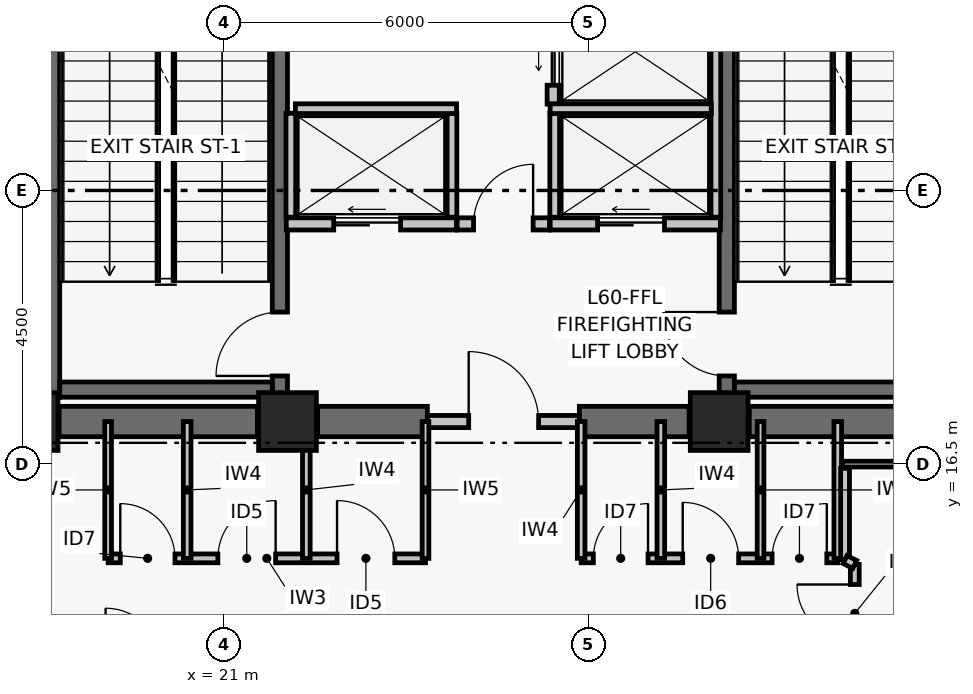
"""IFC4 building model, lengths in metres.
Left out: names, types, materials, properties, quantities, classifications, styles, units other than length and angle.
Written with IfcOpenShell. Run it as: python <this file> out.ifc"""

import sys

from ifc_helpers import new_model, si_unit, direction, frame, frame_2d, origin, origin_2d, place, context, subcontext, project, spatial, rectangle, extrude, element, fill, save


model = new_model("IFC4")
c1 = context("Model", 3, precision=1e-05, world=origin(), true_north=direction((0.0, 1.0)))
c2 = subcontext(c1, "Body", "Model", "MODEL_VIEW")
j1 = project(units=[si_unit("LENGTHUNIT", "METRE"), si_unit("PLANEANGLEUNIT", "RADIAN")], contexts=[c1])
p1 = place(None, origin())
s1 = spatial("IfcSite", under=j1, at=p1, CompositionType="ELEMENT")
p2 = place(p1, origin())
s2 = spatial("IfcBuilding", under=s1, at=p2, CompositionType="ELEMENT")
p3 = place(p2, frame((0.0, 0.0, 238.14)))
s3 = spatial("IfcBuildingStorey", under=s2, at=p3, CompositionType="ELEMENT", Elevation=238.14)
for number, where, z_axis, x_axis in (
    (1, (17.8, 17.2, 0.0), (0.0, 0.0, 1.0), (1.0, 0.0, 0.0)),
    (2, (22.05, 17.2, 0.0), (0.0, 0.0, 1.0), (1.0, 0.0, 0.0)),
    (3, (29.15, 17.2, 0.0), (0.0, 0.0, 1.0), (1.0, 0.0, 0.0)),
):
    element("IfcColumn", number, at=place(p3, frame(where, z_axis=z_axis, x_axis=x_axis)), inside=s3, PredefinedType="COLUMN", context=c2, shape_type="SweptSolid", body=[
        extrude(rectangle(XDim=0.95, YDim=0.95, at=origin_2d()), origin(), (0.0, 0.0, 1.0), 4.5),
    ])
p4 = place(p3, frame((18.295, 17.2, 0.0), z_axis=(0.0, 0.0, 1.0), x_axis=(1.0, 0.0, 0.0)))
e4 = element("IfcWall", 4, at=p4, inside=s3, PredefinedType="SHEAR", context=c2, shape_type="SweptSolid", body=[
    extrude(rectangle(XDim=3.26, YDim=0.5, at=frame_2d((1.63, 0.0))), origin(), (0.0, 0.0, 1.0), 4.22),
])
p5 = place(p3, frame((22.545, 17.2, 0.0), z_axis=(0.0, 0.0, 1.0), x_axis=(1.0, 0.0, 0.0)))
e5 = element("IfcWall", 5, at=p5, inside=s3, PredefinedType="SHEAR", context=c2, shape_type="SweptSolid", body=[
    extrude(rectangle(XDim=1.805, YDim=0.5, at=frame_2d((0.903, 0.0))), origin(), (0.0, 0.0, 1.0), 4.22),
])
p6 = place(p3, frame((26.85, 17.2, 0.0), z_axis=(0.0, 0.0, 1.0), x_axis=(1.0, 0.0, 0.0)))
e6 = element("IfcWall", 6, at=p6, inside=s3, PredefinedType="SHEAR", context=c2, shape_type="SweptSolid", body=[
    extrude(rectangle(XDim=1.805, YDim=0.5, at=frame_2d((0.902, 0.0))), origin(), (0.0, 0.0, 1.0), 4.22),
])
p7 = place(p3, frame((29.645, 17.2, 0.0), z_axis=(0.0, 0.0, 1.0), x_axis=(1.0, 0.0, 0.0)))
e7 = element("IfcWall", 7, at=p7, inside=s3, PredefinedType="SHEAR", context=c2, shape_type="SweptSolid", body=[
    extrude(rectangle(XDim=3.26, YDim=0.5, at=frame_2d((1.63, 0.0))), origin(), (0.0, 0.0, 1.0), 4.22),
])
p8 = place(p3, frame((18.179, 17.6, 0.0), z_axis=(0.0, 0.0, 1.0), x_axis=(0.0, 1.0, 0.0)))
e8 = element("IfcWall", 8, at=p8, inside=s3, PredefinedType="SHEAR", context=c2, shape_type="SweptSolid", body=[
    extrude(rectangle(XDim=8.8, YDim=0.25, at=frame_2d((4.4, 0.0))), origin(), (0.0, 0.0, 1.0), 4.22),
])
p9 = place(p3, frame((21.925, 17.6, 0.0), z_axis=(0.0, 0.0, 1.0), x_axis=(0.0, 1.0, 0.0)))
e9 = element("IfcWall", 9, at=p9, inside=s3, PredefinedType="SHEAR", context=c2, shape_type="SweptSolid", body=[
    extrude(rectangle(XDim=8.8, YDim=0.25, at=frame_2d((4.4, 0.0))), origin(), (0.0, 0.0, 1.0), 4.22),
])
p10 = place(p9, frame((0.35, 0.0, 0.0)))
e10 = element("IfcOpeningElement", 10, at=p10, cuts=e9, PredefinedType="OPENING", context=c2, shape_type="SweptSolid", body=[
    extrude(rectangle(XDim=1.05, YDim=2.08, at=frame_2d((0.525, 1.04))), frame((0.0, 0.135, 0.0), z_axis=(0.0, -1.0, 0.0), x_axis=(1.0, 0.0, 0.0)), (0.0, 0.0, 1.0), 0.27),
])
p11 = place(p3, frame((18.304, 17.725, 0.0), z_axis=(0.0, 0.0, 1.0), x_axis=(1.0, 0.0, 0.0)))
e11 = element("IfcWall", 11, at=p11, inside=s3, PredefinedType="SHEAR", context=c2, shape_type="SweptSolid", body=[
    extrude(rectangle(XDim=3.496, YDim=0.25, at=frame_2d((1.748, 0.0))), origin(), (0.0, 0.0, 1.0), 4.22),
])
p12 = place(p3, frame((29.275, 17.6, 0.0), z_axis=(0.0, 0.0, 1.0), x_axis=(0.0, 1.0, 0.0)))
e12 = element("IfcWall", 12, at=p12, inside=s3, PredefinedType="SHEAR", context=c2, shape_type="SweptSolid", body=[
    extrude(rectangle(XDim=8.8, YDim=0.25, at=frame_2d((4.4, 0.0))), origin(), (0.0, 0.0, 1.0), 4.22),
])
p13 = place(p12, frame((0.35, 0.0, 0.0)))
e13 = element("IfcOpeningElement", 13, at=p13, cuts=e12, PredefinedType="OPENING", context=c2, shape_type="SweptSolid", body=[
    extrude(rectangle(XDim=1.05, YDim=2.08, at=frame_2d((0.525, 1.04))), frame((0.0, 0.135, 0.0), z_axis=(0.0, -1.0, 0.0), x_axis=(1.0, 0.0, 0.0)), (0.0, 0.0, 1.0), 0.27),
])
p14 = place(p3, frame((29.4, 17.725, 0.0), z_axis=(0.0, 0.0, 1.0), x_axis=(1.0, 0.0, 0.0)))
e14 = element("IfcWall", 14, at=p14, inside=s3, PredefinedType="SHEAR", context=c2, shape_type="SweptSolid", body=[
    extrude(rectangle(XDim=3.496, YDim=0.25, at=frame_2d((1.748, 0.0))), origin(), (0.0, 0.0, 1.0), 4.22),
])
p15 = place(p3, frame((24.35, 17.2, 0.0), z_axis=(0.0, 0.0, 1.0), x_axis=(1.0, 0.0, 0.0)))
e15 = element("IfcWall", 15, at=p15, inside=s3, PredefinedType="PARTITIONING", context=c2, shape_type="SweptSolid", body=[
    extrude(rectangle(XDim=2.5, YDim=0.2, at=frame_2d((1.25, 0.0))), origin(), (0.0, 0.0, 1.0), 3.35),
])
p16 = place(p15, frame((0.68, 0.0, 0.0)))
e16 = element("IfcOpeningElement", 16, at=p16, cuts=e15, PredefinedType="OPENING", context=c2, shape_type="SweptSolid", body=[
    extrude(rectangle(XDim=1.15, YDim=2.08, at=frame_2d((0.575, 1.04))), frame((0.0, 0.11, 0.0), z_axis=(0.0, -1.0, 0.0), x_axis=(1.0, 0.0, 0.0)), (0.0, 0.0, 1.0), 0.22),
])
p17 = place(p3, frame((24.84, 20.45, 0.0), z_axis=(0.0, 0.0, 1.0), x_axis=(1.0, 0.0, 0.0)))
e17 = element("IfcWall", 17, at=p17, inside=s3, PredefinedType="PARTITIONING", context=c2, shape_type="SweptSolid", body=[
    extrude(rectangle(XDim=1.52, YDim=0.2, at=frame_2d((0.76, 0.0))), origin(), (0.0, 0.0, 1.0), 4.22),
])
p18 = place(p17, frame((0.27, 0.0, 0.0)))
e18 = element("IfcOpeningElement", 18, at=p18, cuts=e17, PredefinedType="OPENING", context=c2, shape_type="SweptSolid", body=[
    extrude(rectangle(XDim=0.98, YDim=2.06, at=frame_2d((0.49, 1.03))), frame((0.0, 0.11, 0.0), z_axis=(0.0, -1.0, 0.0), x_axis=(1.0, 0.0, 0.0)), (0.0, 0.0, 1.0), 0.22),
])
p19 = place(p3, frame((22.03, 20.45, 0.0), z_axis=(0.0, 0.0, 1.0), x_axis=(1.0, 0.0, 0.0)))
e19 = element("IfcWall", 19, at=p19, inside=s3, PredefinedType="PARTITIONING", context=c2, shape_type="SweptSolid", body=[
    extrude(rectangle(XDim=2.8, YDim=0.2, at=frame_2d((1.4, 0.0))), origin(), (0.0, 0.0, 1.0), 4.22),
])
p20 = place(p19, frame((0.78, 0.0, 0.0)))
e20 = element("IfcOpeningElement", 20, at=p20, cuts=e19, PredefinedType="OPENING", context=c2, shape_type="SweptSolid", body=[
    extrude(rectangle(XDim=1.1, YDim=2.08, at=frame_2d((0.55, 1.04))), frame((0.0, 0.11, 0.0), z_axis=(0.0, -1.0, 0.0), x_axis=(1.0, 0.0, 0.0)), (0.0, 0.0, 1.0), 0.22),
])
p21 = place(p3, frame((26.37, 20.45, 0.0), z_axis=(0.0, 0.0, 1.0), x_axis=(1.0, 0.0, 0.0)))
e21 = element("IfcWall", 21, at=p21, inside=s3, PredefinedType="PARTITIONING", context=c2, shape_type="SweptSolid", body=[
    extrude(rectangle(XDim=2.8, YDim=0.2, at=frame_2d((1.4, 0.0))), origin(), (0.0, 0.0, 1.0), 4.22),
])
p22 = place(p21, frame((0.78, 0.0, 0.0)))
e22 = element("IfcOpeningElement", 22, at=p22, cuts=e21, PredefinedType="OPENING", context=c2, shape_type="SweptSolid", body=[
    extrude(rectangle(XDim=1.1, YDim=2.08, at=frame_2d((0.55, 1.04))), frame((0.0, 0.11, 0.0), z_axis=(0.0, -1.0, 0.0), x_axis=(1.0, 0.0, 0.0)), (0.0, 0.0, 1.0), 0.22),
])
p23 = place(p3, frame((26.42, 22.42, 0.0), z_axis=(0.0, 0.0, 1.0), x_axis=(0.0, 1.0, 0.0)))
e23 = element("IfcWall", 23, at=p23, inside=s3, PredefinedType="PARTITIONING", context=c2, shape_type="SweptSolid", body=[
    extrude(rectangle(XDim=1.72, YDim=0.2, at=frame_2d((0.86, 0.0))), origin(), (0.0, 0.0, 1.0), 4.22),
])
p24 = place(p23, frame((0.31, 0.0, 0.0)))
e24 = element("IfcOpeningElement", 24, at=p24, cuts=e23, PredefinedType="OPENING", context=c2, shape_type="SweptSolid", body=[
    extrude(rectangle(XDim=1.1, YDim=2.08, at=frame_2d((0.55, 1.04))), frame((0.0, 0.11, 0.0), z_axis=(0.0, -1.0, 0.0), x_axis=(1.0, 0.0, 0.0)), (0.0, 0.0, 1.0), 0.22),
])
for number, where, z_axis, x_axis in (
    (25, (22.105, 20.56, 0.0), (0.0, 0.0, 1.0), (0.0, 1.0, 0.0)),
    (26, (24.755, 20.56, 0.0), (0.0, 0.0, 1.0), (0.0, 1.0, 0.0)),
):
    element("IfcWall", number, at=place(p3, frame(where, z_axis=z_axis, x_axis=x_axis)), inside=s3, PredefinedType="PARTITIONING", context=c2, shape_type="SweptSolid", body=[
        extrude(rectangle(XDim=1.71, YDim=0.16, at=frame_2d((0.855, 0.0))), origin(), (0.0, 0.0, 1.0), 4.22),
    ])
p25 = place(p3, frame((22.18, 22.345, 0.0), z_axis=(0.0, 0.0, 1.0), x_axis=(1.0, 0.0, 0.0)))
e27 = element("IfcWall", 27, at=p25, inside=s3, PredefinedType="PARTITIONING", context=c2, shape_type="SweptSolid", body=[
    extrude(rectangle(XDim=2.65, YDim=0.16, at=frame_2d((1.325, 0.0))), origin(), (0.0, 0.0, 1.0), 4.22),
])
p26 = place(p3, frame((29.095, 20.56, 0.0), z_axis=(0.0, 0.0, 1.0), x_axis=(0.0, 1.0, 0.0)))
e28 = element("IfcWall", 28, at=p26, inside=s3, PredefinedType="PARTITIONING", context=c2, shape_type="SweptSolid", body=[
    extrude(rectangle(XDim=3.58, YDim=0.16, at=frame_2d((1.79, 0.0))), origin(), (0.0, 0.0, 1.0), 4.22),
])
p27 = place(p3, frame((26.445, 20.56, 0.0), z_axis=(0.0, 0.0, 1.0), x_axis=(0.0, 1.0, 0.0)))
e29 = element("IfcWall", 29, at=p27, inside=s3, PredefinedType="PARTITIONING", context=c2, shape_type="SweptSolid", body=[
    extrude(rectangle(XDim=1.71, YDim=0.16, at=frame_2d((0.855, 0.0))), origin(), (0.0, 0.0, 1.0), 4.22),
])
p28 = place(p3, frame((26.37, 22.345, 0.0), z_axis=(0.0, 0.0, 1.0), x_axis=(1.0, 0.0, 0.0)))
e30 = element("IfcWall", 30, at=p28, inside=s3, PredefinedType="PARTITIONING", context=c2, shape_type="SweptSolid", body=[
    extrude(rectangle(XDim=2.65, YDim=0.16, at=frame_2d((1.325, 0.0))), origin(), (0.0, 0.0, 1.0), 4.22),
])
p29 = place(p3, frame((19.1, 14.95, 0.0), z_axis=(0.0, 0.0, 1.0), x_axis=(1.0, 0.0, 0.0)))
e31 = element("IfcWall", 31, at=p29, inside=s3, PredefinedType="PARTITIONING", context=c2, shape_type="SweptSolid", body=[
    extrude(rectangle(XDim=5.22, YDim=0.145, at=frame_2d((2.61, 0.0))), origin(), (0.0, 0.0, 1.0), 3.5),
])
p30 = place(p29, frame((0.2, 0.0, 0.0)))
e32 = element("IfcOpeningElement", 32, at=p30, cuts=e31, PredefinedType="OPENING", context=c2, shape_type="SweptSolid", body=[
    extrude(rectangle(XDim=0.9, YDim=2.02, at=frame_2d((0.45, 1.01))), frame((0.0, 0.083, 0.0), z_axis=(0.0, -1.0, 0.0), x_axis=(1.0, 0.0, 0.0)), (0.0, 0.0, 1.0), 0.165),
])
p31 = place(p29, frame((1.805, 0.0, 0.0)))
e33 = element("IfcOpeningElement", 33, at=p31, cuts=e31, PredefinedType="OPENING", context=c2, shape_type="SweptSolid", body=[
    extrude(rectangle(XDim=0.95, YDim=2.06, at=frame_2d((0.475, 1.03))), frame((0.0, 0.083, 0.0), z_axis=(0.0, -1.0, 0.0), x_axis=(1.0, 0.0, 0.0)), (0.0, 0.0, 1.0), 0.165),
])
p32 = place(p29, frame((3.765, 0.0, 0.0)))
e34 = element("IfcOpeningElement", 34, at=p32, cuts=e31, PredefinedType="OPENING", context=c2, shape_type="SweptSolid", body=[
    extrude(rectangle(XDim=0.95, YDim=2.06, at=frame_2d((0.475, 1.03))), frame((0.0, 0.083, 0.0), z_axis=(0.0, -1.0, 0.0), x_axis=(1.0, 0.0, 0.0)), (0.0, 0.0, 1.0), 0.165),
])
p33 = place(p3, frame((26.88, 14.95, 0.0), z_axis=(0.0, 0.0, 1.0), x_axis=(1.0, 0.0, 0.0)))
e35 = element("IfcWall", 35, at=p33, inside=s3, PredefinedType="PARTITIONING", context=c2, shape_type="SweptSolid", body=[
    extrude(rectangle(XDim=4.22, YDim=0.145, at=frame_2d((2.11, 0.0))), origin(), (0.0, 0.0, 1.0), 3.7),
])
p34 = place(p33, frame((0.2, 0.0, 0.0)))
e36 = element("IfcOpeningElement", 36, at=p34, cuts=e35, PredefinedType="OPENING", context=c2, shape_type="SweptSolid", body=[
    extrude(rectangle(XDim=0.9, YDim=2.02, at=frame_2d((0.45, 1.01))), frame((0.0, 0.083, 0.0), z_axis=(0.0, -1.0, 0.0), x_axis=(1.0, 0.0, 0.0)), (0.0, 0.0, 1.0), 0.165),
])
p35 = place(p33, frame((1.67, 0.0, 0.0)))
e37 = element("IfcOpeningElement", 37, at=p35, cuts=e35, PredefinedType="OPENING", context=c2, shape_type="SweptSolid", body=[
    extrude(rectangle(XDim=0.92, YDim=2.05, at=frame_2d((0.46, 1.025))), frame((0.0, 0.083, 0.0), z_axis=(0.0, -1.0, 0.0), x_axis=(1.0, 0.0, 0.0)), (0.0, 0.0, 1.0), 0.165),
])
p36 = place(p33, frame((3.14, 0.0, 0.0)))
e38 = element("IfcOpeningElement", 38, at=p36, cuts=e35, PredefinedType="OPENING", context=c2, shape_type="SweptSolid", body=[
    extrude(rectangle(XDim=0.9, YDim=2.02, at=frame_2d((0.45, 1.01))), frame((0.0, 0.083, 0.0), z_axis=(0.0, -1.0, 0.0), x_axis=(1.0, 0.0, 0.0)), (0.0, 0.0, 1.0), 0.165),
])
p37 = place(p3, frame((19.1, 14.95, 0.0), z_axis=(0.0, 0.0, 1.0), x_axis=(0.0, 1.0, 0.0)))
e39 = element("IfcWall", 39, at=p37, inside=s3, PredefinedType="PARTITIONING", context=c2, shape_type="SweptSolid", body=[
    extrude(rectangle(XDim=2.25, YDim=0.11, at=frame_2d((1.125, 0.0))), origin(), (0.0, 0.0, 1.0), 3.35),
])
for number, where, z_axis, x_axis in (
    (40, (20.4, 14.95, 0.0), (0.0, 0.0, 1.0), (0.0, 1.0, 0.0)),
    (41, (22.36, 14.95, 0.0), (0.0, 0.0, 1.0), (0.0, 1.0, 0.0)),
):
    element("IfcWall", number, at=place(p3, frame(where, z_axis=z_axis, x_axis=x_axis)), inside=s3, PredefinedType="PARTITIONING", context=c2, shape_type="SweptSolid", body=[
        extrude(rectangle(XDim=2.25, YDim=0.125, at=frame_2d((1.125, 0.0))), origin(), (0.0, 0.0, 1.0), 3.35),
    ])
p38 = place(p3, frame((24.32, 14.95, 0.0), z_axis=(0.0, 0.0, 1.0), x_axis=(0.0, 1.0, 0.0)))
e42 = element("IfcWall", 42, at=p38, inside=s3, PredefinedType="PARTITIONING", context=c2, shape_type="SweptSolid", body=[
    extrude(rectangle(XDim=2.25, YDim=0.11, at=frame_2d((1.125, 0.0))), origin(), (0.0, 0.0, 1.0), 3.35),
])
for number, where, z_axis, x_axis in (
    (43, (26.88, 14.95, 0.0), (0.0, 0.0, 1.0), (0.0, 1.0, 0.0)),
    (44, (28.19, 14.95, 0.0), (0.0, 0.0, 1.0), (0.0, 1.0, 0.0)),
):
    element("IfcWall", number, at=place(p3, frame(where, z_axis=z_axis, x_axis=x_axis)), inside=s3, PredefinedType="PARTITIONING", context=c2, shape_type="SweptSolid", body=[
        extrude(rectangle(XDim=2.25, YDim=0.125, at=frame_2d((1.125, 0.0))), origin(), (0.0, 0.0, 1.0), 3.35),
    ])
p39 = place(p3, frame((29.83, 14.95, 0.0), z_axis=(0.0, 0.0, 1.0), x_axis=(0.0, 1.0, 0.0)))
e45 = element("IfcWall", 45, at=p39, inside=s3, PredefinedType="PARTITIONING", context=c2, shape_type="SweptSolid", body=[
    extrude(rectangle(XDim=2.25, YDim=0.11, at=frame_2d((1.125, 0.0))), origin(), (0.0, 0.0, 1.0), 3.35),
])
p40 = place(p3, frame((31.1, 14.95, 0.0), z_axis=(0.0, 0.0, 1.0), x_axis=(0.0, 1.0, 0.0)))
e46 = element("IfcWall", 46, at=p40, inside=s3, PredefinedType="PARTITIONING", context=c2, shape_type="SweptSolid", body=[
    extrude(rectangle(XDim=2.25, YDim=0.125, at=frame_2d((1.125, 0.0))), origin(), (0.0, 0.0, 1.0), 3.35),
])
p41 = place(p3, frame((31.38, 13.29, 0.0), z_axis=(0.0, 0.0, 1.0), x_axis=(0.0, 1.0, 0.0)))
e47 = element("IfcWall", 47, at=p41, inside=s3, PredefinedType="PARTITIONING", context=c2, shape_type="SweptSolid", body=[
    extrude(rectangle(XDim=1.56, YDim=0.145, at=frame_2d((0.78, 0.0))), origin(), (0.0, 0.0, 1.0), 4.22),
])
p42 = place(p41, frame((0.28, 0.0, 0.0)))
e48 = element("IfcOpeningElement", 48, at=p42, cuts=e47, PredefinedType="OPENING", context=c2, shape_type="SweptSolid", body=[
    extrude(rectangle(XDim=0.95, YDim=2.06, at=frame_2d((0.475, 1.03))), frame((0.0, 0.083, 0.0), z_axis=(0.0, -1.0, 0.0), x_axis=(1.0, 0.0, 0.0)), (0.0, 0.0, 1.0), 0.165),
])
p43 = place(p3, frame((31.22, 14.93, 0.0), z_axis=(0.0, 0.0, 1.0), x_axis=(0.0, 1.0, 0.0)))
e49 = element("IfcWall", 49, at=p43, inside=s3, PredefinedType="PARTITIONING", context=c2, shape_type="SweptSolid", body=[
    extrude(rectangle(XDim=1.5, YDim=0.145, at=frame_2d((0.75, 0.0))), origin(), (0.0, 0.0, 1.0), 3.7),
])
p44 = place(p3, frame((31.17, 16.5, 0.0), z_axis=(0.0, 0.0, 1.0), x_axis=(1.0, 0.0, 0.0)))
e50 = element("IfcWall", 50, at=p44, inside=s3, PredefinedType="PARTITIONING", context=c2, shape_type="SweptSolid", body=[
    extrude(rectangle(XDim=16.534, YDim=0.095, at=frame_2d((8.267, 0.0))), origin(), (0.0, 0.0, 1.0), 3.7),
])
p45 = place(p44, frame((7.807, 0.0, 0.0)))
e51 = element("IfcOpeningElement", 51, at=p45, cuts=e50, PredefinedType="OPENING", context=c2, shape_type="SweptSolid", body=[
    extrude(rectangle(XDim=0.92, YDim=2.05, at=frame_2d((0.46, 1.025))), frame((0.0, 0.057, 0.0), z_axis=(0.0, -1.0, 0.0), x_axis=(1.0, 0.0, 0.0)), (0.0, 0.0, 1.0), 0.115),
])
p46 = place(p3, frame((31.38, 14.85, 0.0), z_axis=(0.0, 0.0, 1.0), x_axis=(-0.89470021502, 0.446667130247, 0.0)))
e52 = element("IfcWall", 52, at=p46, inside=s3, PredefinedType="PARTITIONING", context=c2, shape_type="SweptSolid", body=[
    extrude(rectangle(XDim=0.179, YDim=0.145, at=frame_2d((0.089, 0.0))), origin(), (0.0, 0.0, 1.0), 4.22),
])
p47 = place(p10, origin())
e53 = element("IfcDoor", 53, at=p47, inside=s3, OperationType="SINGLE_SWING_LEFT", PredefinedType="DOOR", context=c2, shape_type="SweptSolid", body=[
    extrude(rectangle(XDim=1.05, YDim=2.08, at=frame_2d((0.525, 1.04))), frame((0.0, 0.025, 0.0), z_axis=(0.0, -1.0, 0.0), x_axis=(1.0, 0.0, 0.0)), (0.0, 0.0, 1.0), 0.05),
])
fill(e10, e53)
p48 = place(p13, origin())
e54 = element("IfcDoor", 54, at=p48, inside=s3, OperationType="SINGLE_SWING_RIGHT", PredefinedType="DOOR", context=c2, shape_type="SweptSolid", body=[
    extrude(rectangle(XDim=1.05, YDim=2.08, at=frame_2d((0.525, 1.04))), frame((0.0, 0.025, 0.0), z_axis=(0.0, -1.0, 0.0), x_axis=(1.0, 0.0, 0.0)), (0.0, 0.0, 1.0), 0.05),
])
fill(e13, e54)
p49 = place(p16, origin())
e55 = element("IfcDoor", 55, at=p49, inside=s3, OperationType="SINGLE_SWING_LEFT", PredefinedType="DOOR", context=c2, shape_type="SweptSolid", body=[
    extrude(rectangle(XDim=1.15, YDim=2.08, at=frame_2d((0.575, 1.04))), frame((0.0, 0.025, 0.0), z_axis=(0.0, -1.0, 0.0), x_axis=(1.0, 0.0, 0.0)), (0.0, 0.0, 1.0), 0.05),
])
fill(e16, e55)
p50 = place(p18, origin())
e56 = element("IfcDoor", 56, at=p50, inside=s3, OperationType="SINGLE_SWING_RIGHT", PredefinedType="DOOR", context=c2, shape_type="SweptSolid", body=[
    extrude(rectangle(XDim=0.98, YDim=2.06, at=frame_2d((0.49, 1.03))), frame((0.0, 0.025, 0.0), z_axis=(0.0, -1.0, 0.0), x_axis=(1.0, 0.0, 0.0)), (0.0, 0.0, 1.0), 0.05),
])
fill(e18, e56)
p51 = place(p20, origin())
e57 = element("IfcDoor", 57, at=p51, inside=s3, OperationType="DOUBLE_DOOR_SLIDING", PredefinedType="DOOR", context=c2, shape_type="SweptSolid", body=[
    extrude(rectangle(XDim=1.1, YDim=2.08, at=frame_2d((0.55, 1.04))), frame((0.0, 0.025, 0.0), z_axis=(0.0, -1.0, 0.0), x_axis=(1.0, 0.0, 0.0)), (0.0, 0.0, 1.0), 0.05),
])
fill(e20, e57)
p52 = place(p22, origin())
e58 = element("IfcDoor", 58, at=p52, inside=s3, OperationType="DOUBLE_DOOR_SLIDING", PredefinedType="DOOR", context=c2, shape_type="SweptSolid", body=[
    extrude(rectangle(XDim=1.1, YDim=2.08, at=frame_2d((0.55, 1.04))), frame((0.0, 0.025, 0.0), z_axis=(0.0, -1.0, 0.0), x_axis=(1.0, 0.0, 0.0)), (0.0, 0.0, 1.0), 0.05),
])
fill(e22, e58)
p53 = place(p24, origin())
e59 = element("IfcDoor", 59, at=p53, inside=s3, OperationType="DOUBLE_DOOR_SLIDING", PredefinedType="DOOR", context=c2, shape_type="SweptSolid", body=[
    extrude(rectangle(XDim=1.1, YDim=2.08, at=frame_2d((0.55, 1.04))), frame((0.0, 0.025, 0.0), z_axis=(0.0, -1.0, 0.0), x_axis=(1.0, 0.0, 0.0)), (0.0, 0.0, 1.0), 0.05),
])
fill(e24, e59)
p54 = place(p30, origin())
e60 = element("IfcDoor", 60, at=p54, inside=s3, OperationType="SINGLE_SWING_LEFT", PredefinedType="DOOR", context=c2, shape_type="SweptSolid", body=[
    extrude(rectangle(XDim=0.9, YDim=2.02, at=frame_2d((0.45, 1.01))), frame((0.0, 0.025, 0.0), z_axis=(0.0, -1.0, 0.0), x_axis=(1.0, 0.0, 0.0)), (0.0, 0.0, 1.0), 0.05),
])
fill(e32, e60)
p55 = place(p31, origin())
e61 = element("IfcDoor", 61, at=p55, inside=s3, OperationType="SINGLE_SWING_RIGHT", PredefinedType="DOOR", context=c2, shape_type="SweptSolid", body=[
    extrude(rectangle(XDim=0.95, YDim=2.06, at=frame_2d((0.475, 1.03))), frame((0.0, 0.025, 0.0), z_axis=(0.0, -1.0, 0.0), x_axis=(1.0, 0.0, 0.0)), (0.0, 0.0, 1.0), 0.05),
])
fill(e33, e61)
p56 = place(p32, origin())
e62 = element("IfcDoor", 62, at=p56, inside=s3, OperationType="SINGLE_SWING_LEFT", PredefinedType="DOOR", context=c2, shape_type="SweptSolid", body=[
    extrude(rectangle(XDim=0.95, YDim=2.06, at=frame_2d((0.475, 1.03))), frame((0.0, 0.025, 0.0), z_axis=(0.0, -1.0, 0.0), x_axis=(1.0, 0.0, 0.0)), (0.0, 0.0, 1.0), 0.05),
])
fill(e34, e62)
p57 = place(p34, origin())
e63 = element("IfcDoor", 63, at=p57, inside=s3, OperationType="SINGLE_SWING_RIGHT", PredefinedType="DOOR", context=c2, shape_type="SweptSolid", body=[
    extrude(rectangle(XDim=0.9, YDim=2.02, at=frame_2d((0.45, 1.01))), frame((0.0, 0.025, 0.0), z_axis=(0.0, -1.0, 0.0), x_axis=(1.0, 0.0, 0.0)), (0.0, 0.0, 1.0), 0.05),
])
fill(e36, e63)
p58 = place(p35, origin())
e64 = element("IfcDoor", 64, at=p58, inside=s3, OperationType="SINGLE_SWING_LEFT", PredefinedType="DOOR", context=c2, shape_type="SweptSolid", body=[
    extrude(rectangle(XDim=0.92, YDim=2.05, at=frame_2d((0.46, 1.025))), frame((0.0, 0.025, 0.0), z_axis=(0.0, -1.0, 0.0), x_axis=(1.0, 0.0, 0.0)), (0.0, 0.0, 1.0), 0.05),
])
fill(e37, e64)
p59 = place(p36, origin())
e65 = element("IfcDoor", 65, at=p59, inside=s3, OperationType="SINGLE_SWING_RIGHT", PredefinedType="DOOR", context=c2, shape_type="SweptSolid", body=[
    extrude(rectangle(XDim=0.9, YDim=2.02, at=frame_2d((0.45, 1.01))), frame((0.0, 0.025, 0.0), z_axis=(0.0, -1.0, 0.0), x_axis=(1.0, 0.0, 0.0)), (0.0, 0.0, 1.0), 0.05),
])
fill(e38, e65)
p60 = place(p42, origin())
e66 = element("IfcDoor", 66, at=p60, inside=s3, OperationType="SINGLE_SWING_RIGHT", PredefinedType="DOOR", context=c2, shape_type="SweptSolid", body=[
    extrude(rectangle(XDim=0.95, YDim=2.06, at=frame_2d((0.475, 1.03))), frame((0.0, 0.025, 0.0), z_axis=(0.0, -1.0, 0.0), x_axis=(1.0, 0.0, 0.0)), (0.0, 0.0, 1.0), 0.05),
])
fill(e48, e66)
save(model, sys.argv[1])
